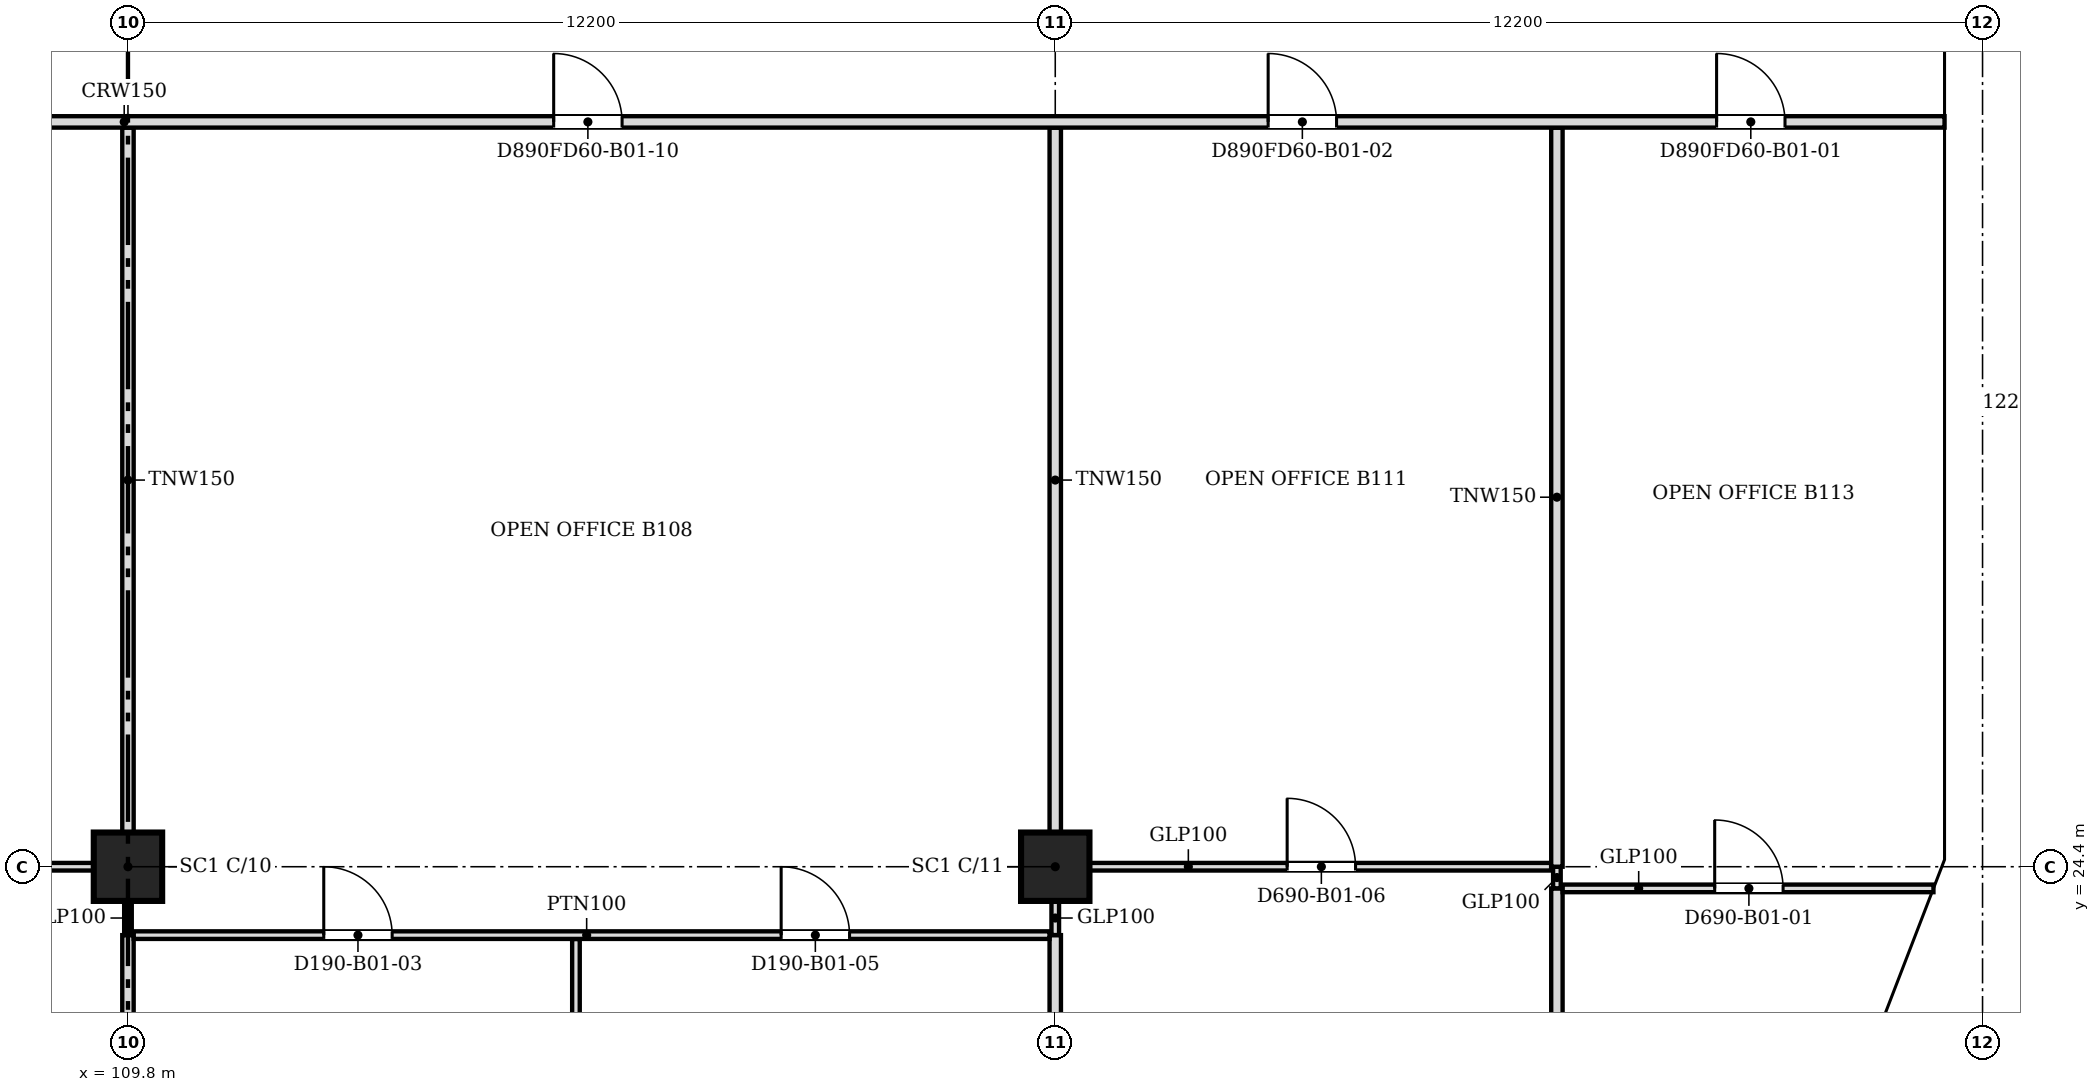
"""IFC4 building model, lengths in metres.
Left out: names, types, materials, properties, quantities, classifications, styles, units other than length and angle.
Written with IfcOpenShell. Run it as: python <this file> out.ifc"""

import sys

from ifc_helpers import new_model, si_unit, direction, frame, frame_2d, origin, origin_2d, place, context, subcontext, project, spatial, polyline, rectangle, outline, extrude, faceted_brep, source, transform, mapped, element, fill, save


model = new_model("IFC4")
c1 = context("Model", 3, precision=1e-05, world=origin(), true_north=direction((0.0, 1.0)))
c2 = subcontext(c1, "Body", "Model", "MODEL_VIEW")
j1 = project(units=[si_unit("LENGTHUNIT", "METRE"), si_unit("PLANEANGLEUNIT", "RADIAN")], contexts=[c1])
p1 = place(None, origin())
s1 = spatial("IfcSite", under=j1, at=p1, CompositionType="ELEMENT")
p2 = place(p1, origin())
s2 = spatial("IfcBuilding", under=s1, at=p2, CompositionType="ELEMENT")
p3 = place(p2, frame((0.0, 0.0, 16.8)))
s3 = spatial("IfcBuildingStorey", under=s2, at=p3, CompositionType="ELEMENT", Elevation=16.8)
for number, where, z_axis, x_axis in (
    (1, (109.8, 24.4, 0.0), (0.0, 0.0, 1.0), (1.0, 0.0, 0.0)),
    (2, (122.0, 24.4, 0.0), (0.0, 0.0, 1.0), (1.0, 0.0, 0.0)),
):
    element("IfcColumn", number, at=place(p3, frame(where, z_axis=z_axis, x_axis=x_axis)), inside=s3, PredefinedType="COLUMN", context=c2, shape_type="SweptSolid", body=[
        extrude(rectangle(XDim=0.9, YDim=0.9, at=origin_2d()), origin(), (0.0, 0.0, 1.0), 4.3),
    ])
m1 = source(origin(), c2, "Body", "Brep", [
    faceted_brep([(3.003, -0.25, 0.0), (0.053, -0.25, 4.5), (0.0, -0.25, 4.419), (0.0, -0.25, 0.0), (0.106, 0.25, 4.419), (2.957, 0.25, 0.071), (2.957, 0.25, 0.0), (0.106, 0.25, 0.0), (0.053, 0.0, 4.5), (3.003, 0.0, 0.0)], [[[0, 1, 2, 3]], [[4, 5, 6, 7]], [[5, 4, 8, 1, 0, 9]], [[2, 1, 8]], [[7, 6, 9, 0, 3]], [[7, 3, 2, 8, 4]], [[9, 6, 5]]]),
])
p4 = place(p3, frame((132.869, 21.644, 0.0), z_axis=(0.0, 0.0, 1.0), x_axis=(0.359855894603, 0.933007896601, 0.0)))
e3 = element("IfcWall", 3, at=p4, inside=s3, PredefinedType="SOLIDWALL", context=c2, shape_type="MappedRepresentation", body=[
    mapped(m1, transform((0.0, 0.0, 0.0), scale=1.0)),
])
m2 = source(origin(), c2, "Body", "SweptSolid", [
    extrude(outline(polyline([(2.541, 0.25), (0.253, 3.739), (0.253, 0.25), (2.541, 0.25)])), frame((0.0, 0.26, 0.0), z_axis=(0.0, -1.0, 0.0), x_axis=(1.0, 0.0, 0.0)), (0.0, 0.0, 1.0), 0.52),
])
p5 = place(p4, origin())
e4 = element("IfcOpeningElement", 4, at=p5, cuts=e3, PredefinedType="OPENING", context=c2, shape_type="MappedRepresentation", body=[
    mapped(m2, transform((0.0, 0.0, 0.0), scale=1.0)),
])
m3 = source(origin(), c2, "Body", "Brep", [
    faceted_brep([(6.053, -0.25, 0.0), (3.003, -0.25, 4.5), (0.0, -0.25, 0.0), (0.047, 0.25, 0.07), (3.003, 0.25, 4.5), (6.053, 0.25, 0.0), (0.047, 0.25, 0.0), (0.0, 0.0, 0.0)], [[[0, 1, 2]], [[3, 4, 5, 6]], [[5, 4, 1, 0]], [[4, 3, 7, 2, 1]], [[6, 5, 0, 2, 7]], [[6, 7, 3]]]),
])
p6 = place(p3, frame((133.95, 24.447, 0.0), z_axis=(0.0, 0.0, 1.0), x_axis=(0.0, 1.0, 0.0)))
e5 = element("IfcWall", 5, at=p6, inside=s3, PredefinedType="SOLIDWALL", context=c2, shape_type="MappedRepresentation", body=[
    mapped(m3, transform((0.0, 0.0, 0.0), scale=1.0)),
])
m4 = source(origin(), c2, "Body", "SweptSolid", [
    extrude(outline(polyline([(5.582, 0.25), (3.005, 4.052), (0.468, 0.25), (5.582, 0.25)])), frame((0.0, 0.26, 0.0), z_axis=(0.0, -1.0, 0.0), x_axis=(1.0, 0.0, 0.0)), (0.0, 0.0, 1.0), 0.52),
])
p7 = place(p6, origin())
e6 = element("IfcOpeningElement", 6, at=p7, cuts=e5, PredefinedType="OPENING", context=c2, shape_type="MappedRepresentation", body=[
    mapped(m4, transform((0.0, 0.0, 0.0), scale=1.0)),
])
m5 = source(origin(), c2, "Body", "SweptSolid", [
    extrude(outline(polyline([(6.1, 0.0), (3.05, 4.5), (0.0, 0.0), (6.1, 0.0)])), frame((0.0, 0.25, 0.0), z_axis=(0.0, -1.0, 0.0), x_axis=(1.0, 0.0, 0.0)), (0.0, 0.0, 1.0), 0.5),
])
p8 = place(p3, frame((133.95, 30.5, 0.0), z_axis=(0.0, 0.0, 1.0), x_axis=(0.0, 1.0, 0.0)))
e7 = element("IfcWall", 7, at=p8, inside=s3, PredefinedType="SOLIDWALL", context=c2, shape_type="MappedRepresentation", body=[
    mapped(m5, transform((0.0, 0.0, 0.0), scale=1.0)),
])
m6 = source(origin(), c2, "Body", "SweptSolid", [
    extrude(outline(polyline([(5.629, 0.25), (3.05, 4.054), (0.471, 0.25), (5.629, 0.25)])), frame((0.0, 0.26, 0.0), z_axis=(0.0, -1.0, 0.0), x_axis=(1.0, 0.0, 0.0)), (0.0, 0.0, 1.0), 0.52),
])
p9 = place(p8, origin())
e8 = element("IfcOpeningElement", 8, at=p9, cuts=e7, PredefinedType="OPENING", context=c2, shape_type="MappedRepresentation", body=[
    mapped(m6, transform((0.0, 0.0, 0.0), scale=1.0)),
])
p10 = place(p2, frame((0.0, 0.0, 21.3)))
s4 = spatial("IfcBuildingStorey", under=s2, at=p10, CompositionType="ELEMENT", Elevation=21.3)
m7 = source(origin(), c2, "Body", "Brep", [
    faceted_brep([(2.95, -0.25, 0.0), (2.997, -0.25, 0.07), (2.997, -0.25, 8.93), (2.95, -0.25, 9.0), (0.0, -0.25, 4.5), (0.053, 0.25, 4.581), (2.904, 0.25, 8.929), (2.904, 0.25, 0.071), (0.053, 0.25, 4.419), (2.95, 0.0, 0.0), (2.95, 0.0, 9.0), (0.0, 0.0, 4.5)], [[[0, 1, 2, 3, 4]], [[5, 6, 7, 8]], [[1, 0, 9]], [[10, 3, 2]], [[6, 5, 11, 4, 3, 10]], [[8, 7, 9, 0, 4, 11]], [[8, 11, 5]], [[1, 9, 7, 6, 10, 2]]]),
])
p11 = place(p10, frame((132.888, 21.694, -4.5), z_axis=(0.0, 0.0, 1.0), x_axis=(0.359901446078, 0.932990326376, 0.0)))
e9 = element("IfcWall", 9, at=p11, inside=s4, PredefinedType="SOLIDWALL", context=c2, shape_type="MappedRepresentation", body=[
    mapped(m7, transform((0.0, 0.0, 0.0), scale=1.0)),
])
m8 = source(origin(), c2, "Body", "SweptSolid", [
    extrude(outline(polyline([(2.75, 8.239), (0.299, 4.5), (2.75, 0.761), (2.75, 8.239)])), frame((0.0, 0.26, 0.0), z_axis=(0.0, -1.0, 0.0), x_axis=(1.0, 0.0, 0.0)), (0.0, 0.0, 1.0), 0.52),
])
p12 = place(p11, origin())
e10 = element("IfcOpeningElement", 10, at=p12, cuts=e9, PredefinedType="OPENING", context=c2, shape_type="MappedRepresentation", body=[
    mapped(m8, transform((0.0, 0.0, 0.0), scale=1.0)),
])
m9 = source(origin(), c2, "Body", "Brep", [
    faceted_brep([(0.047, -0.25, 0.0), (3.05, -0.25, 4.5), (0.047, -0.25, 9.0), (0.0, -0.25, 8.929), (0.0, -0.25, 0.071), (0.093, 0.25, 8.93), (3.05, 0.25, 4.5), (0.093, 0.25, 0.07), (0.047, 0.0, 0.0), (0.047, 0.0, 9.0)], [[[0, 1, 2, 3, 4]], [[5, 6, 7]], [[7, 6, 1, 0, 8]], [[6, 5, 9, 2, 1]], [[3, 2, 9]], [[8, 0, 4]], [[7, 8, 4, 3, 9, 5]]]),
])
p13 = place(p10, frame((133.95, 24.4, -4.5), z_axis=(0.0, 0.0, 1.0), x_axis=(0.0, 1.0, 0.0)))
e11 = element("IfcWall", 11, at=p13, inside=s4, PredefinedType="SOLIDWALL", context=c2, shape_type="MappedRepresentation", body=[
    mapped(m9, transform((0.0, 0.0, 0.0), scale=1.0)),
])
m10 = source(origin(), c2, "Body", "SweptSolid", [
    extrude(outline(polyline([(0.247, 0.75), (2.75, 4.5), (0.247, 8.25), (0.247, 0.75)])), frame((0.0, 0.26, 0.0), z_axis=(0.0, -1.0, 0.0), x_axis=(1.0, 0.0, 0.0)), (0.0, 0.0, 1.0), 0.52),
])
p14 = place(p13, origin())
e12 = element("IfcOpeningElement", 12, at=p14, cuts=e11, PredefinedType="OPENING", context=c2, shape_type="MappedRepresentation", body=[
    mapped(m10, transform((0.0, 0.0, 0.0), scale=1.0)),
])
m11 = source(origin(), c2, "Body", "SweptSolid", [
    extrude(outline(polyline([(3.05, 0.0), (6.1, 4.5), (3.05, 9.0), (0.0, 4.5), (3.05, 0.0)])), frame((0.0, 0.25, 0.0), z_axis=(0.0, -1.0, 0.0), x_axis=(1.0, 0.0, 0.0)), (0.0, 0.0, 1.0), 0.5),
])
p15 = place(p10, frame((133.95, 27.45, -4.5), z_axis=(0.0, 0.0, 1.0), x_axis=(0.0, 1.0, 0.0)))
e13 = element("IfcWall", 13, at=p15, inside=s4, PredefinedType="SOLIDWALL", context=c2, shape_type="MappedRepresentation", body=[
    mapped(m11, transform((0.0, 0.0, 0.0), scale=1.0)),
])
m12 = source(origin(), c2, "Body", "SweptSolid", [
    extrude(outline(polyline([(3.05, 0.446), (5.798, 4.5), (3.05, 8.554), (0.302, 4.5), (3.05, 0.446)])), frame((0.0, 0.26, 0.0), z_axis=(0.0, -1.0, 0.0), x_axis=(1.0, 0.0, 0.0)), (0.0, 0.0, 1.0), 0.52),
])
p16 = place(p15, origin())
e14 = element("IfcOpeningElement", 14, at=p16, cuts=e13, PredefinedType="OPENING", context=c2, shape_type="MappedRepresentation", body=[
    mapped(m12, transform((0.0, 0.0, 0.0), scale=1.0)),
])
m13 = source(origin(), c2, "Body", "Brep", [
    faceted_brep([(3.05, -0.25, 0.0), (6.1, -0.25, 4.5), (6.1, -0.25, 4.5), (3.05, -0.25, 9.0), (0.0, -0.25, 4.5), (0.0, 0.25, 4.5), (3.05, 0.25, 9.0), (6.1, 0.25, 4.5), (6.1, 0.25, 4.5), (3.05, 0.25, 0.0)], [[[0, 1, 2, 3, 4]], [[5, 6, 7, 8, 9]], [[9, 8, 1, 0]], [[7, 6, 3, 2]], [[6, 5, 4, 3]], [[5, 9, 0, 4]], [[1, 8, 7, 2]]]),
])
p17 = place(p10, frame((133.95, 33.55, -4.5), z_axis=(0.0, 0.0, 1.0), x_axis=(0.0, 1.0, 0.0)))
e15 = element("IfcWall", 15, at=p17, inside=s4, PredefinedType="SOLIDWALL", context=c2, shape_type="MappedRepresentation", body=[
    mapped(m13, transform((0.0, 0.0, 0.0), scale=1.0)),
])
p18 = place(p17, origin())
e16 = element("IfcOpeningElement", 16, at=p18, cuts=e15, PredefinedType="OPENING", context=c2, shape_type="MappedRepresentation", body=[
    mapped(m12, transform((0.0, 0.0, 0.0), scale=1.0)),
])
p19 = place(p3, frame((109.8, 18.8, 0.0), z_axis=(0.0, 0.0, 1.0), x_axis=(0.0, 1.0, 0.0)))
e17 = element("IfcWall", 17, at=p19, inside=s3, PredefinedType="PARTITIONING", context=c2, shape_type="SweptSolid", body=[
    extrude(rectangle(XDim=4.7, YDim=0.15, at=frame_2d((2.35, 0.0))), origin(), (0.0, 0.0, 1.0), 3.415),
])
p20 = place(p3, frame((115.694, 18.8, 0.0), z_axis=(0.0, 0.0, 1.0), x_axis=(0.0, 1.0, 0.0)))
e18 = element("IfcWall", 18, at=p20, inside=s3, PredefinedType="PARTITIONING", context=c2, shape_type="SweptSolid", body=[
    extrude(rectangle(XDim=4.649, YDim=0.1, at=frame_2d((2.324, 0.0))), origin(), (0.0, 0.0, 1.0), 3.415),
])
p21 = place(p3, frame((122.0, 18.8, 0.0), z_axis=(0.0, 0.0, 1.0), x_axis=(0.0, 1.0, 0.0)))
e19 = element("IfcWall", 19, at=p21, inside=s3, PredefinedType="PARTITIONING", context=c2, shape_type="SweptSolid", body=[
    extrude(rectangle(XDim=4.7, YDim=0.15, at=frame_2d((2.35, 0.0))), origin(), (0.0, 0.0, 1.0), 3.415),
])
p22 = place(p3, frame((128.6, 19.029, 0.0), z_axis=(0.0, 0.0, 1.0), x_axis=(0.0, 1.0, 0.0)))
e20 = element("IfcWall", 20, at=p22, inside=s3, PredefinedType="PARTITIONING", context=c2, shape_type="SweptSolid", body=[
    extrude(rectangle(XDim=5.086, YDim=0.15, at=frame_2d((2.543, 0.0))), origin(), (0.0, 0.0, 1.0), 3.415),
])
p23 = place(p3, frame((109.8, 23.501, 0.0), z_axis=(0.0, 0.0, 1.0), x_axis=(0.0, 1.0, 0.0)))
e21 = element("IfcWall", 21, at=p23, inside=s3, PredefinedType="PARTITIONING", context=c2, shape_type="SweptSolid", body=[
    extrude(rectangle(XDim=0.448, YDim=0.1, at=frame_2d((0.224, 0.0))), origin(), (0.0, 0.0, 1.0), 3.415),
])
p24 = place(p3, frame((121.924, 23.5, 0.0), z_axis=(0.0, 0.0, 1.0), x_axis=(-1.0, 0.0, 0.0)))
e22 = element("IfcWall", 22, at=p24, inside=s3, PredefinedType="PARTITIONING", context=c2, shape_type="SweptSolid", body=[
    extrude(rectangle(XDim=12.048, YDim=0.1, at=frame_2d((6.024, 0.0))), origin(), (0.0, 0.0, 1.0), 3.415),
])
m14 = source(origin(), c2, "Body", "SweptSolid", [
    extrude(rectangle(XDim=0.9, YDim=2.1, at=frame_2d((0.45, 1.05))), frame((0.0, 0.06, 0.0), z_axis=(0.0, -1.0, 0.0), x_axis=(1.0, 0.0, 0.0)), (0.0, 0.0, 1.0), 0.12),
])
p25 = place(p24, frame((8.648, 0.0, 0.0)))
e23 = element("IfcOpeningElement", 23, at=p25, cuts=e22, PredefinedType="OPENING", context=c2, shape_type="MappedRepresentation", body=[
    mapped(m14, transform((0.0, 0.0, 0.0), scale=1.0)),
])
p26 = place(p24, frame((2.63, 0.0, 0.0)))
e24 = element("IfcOpeningElement", 24, at=p26, cuts=e22, PredefinedType="OPENING", context=c2, shape_type="MappedRepresentation", body=[
    mapped(m14, transform((0.0, 0.0, 0.0), scale=1.0)),
])
p27 = place(p3, frame((122.0, 23.501, 0.0), z_axis=(0.0, 0.0, 1.0), x_axis=(0.0, 1.0, 0.0)))
e25 = element("IfcWall", 25, at=p27, inside=s3, PredefinedType="PARTITIONING", context=c2, shape_type="SweptSolid", body=[
    extrude(rectangle(XDim=0.448, YDim=0.1, at=frame_2d((0.224, 0.0))), origin(), (0.0, 0.0, 1.0), 3.415),
])
p28 = place(p3, frame((133.554, 24.115, 0.0), z_axis=(0.0, 0.0, 1.0), x_axis=(-1.0, 0.0, 0.0)))
e26 = element("IfcWall", 26, at=p28, inside=s3, PredefinedType="PARTITIONING", context=c2, shape_type="SweptSolid", body=[
    extrude(rectangle(XDim=4.878, YDim=0.1, at=frame_2d((2.439, 0.0))), origin(), (0.0, 0.0, 1.0), 3.415),
])
p29 = place(p28, frame((1.978, 0.0, 0.0)))
e27 = element("IfcOpeningElement", 27, at=p29, cuts=e26, PredefinedType="OPENING", context=c2, shape_type="MappedRepresentation", body=[
    mapped(m14, transform((0.0, 0.0, 0.0), scale=1.0)),
])
p30 = place(p3, frame((128.6, 24.116, 0.0), z_axis=(0.0, 0.0, 1.0), x_axis=(0.0, 1.0, 0.0)))
e28 = element("IfcWall", 28, at=p30, inside=s3, PredefinedType="PARTITIONING", context=c2, shape_type="SweptSolid", body=[
    extrude(rectangle(XDim=0.283, YDim=0.1, at=frame_2d((0.142, 0.0))), origin(), (0.0, 0.0, 1.0), 3.415),
])
p31 = place(p3, frame((109.349, 24.4, 0.0), z_axis=(0.0, 0.0, 1.0), x_axis=(-1.0, 0.0, 0.0)))
e29 = element("IfcWall", 29, at=p31, inside=s3, PredefinedType="PARTITIONING", context=c2, shape_type="SweptSolid", body=[
    extrude(rectangle(XDim=5.804, YDim=0.1, at=frame_2d((2.902, 0.0))), origin(), (0.0, 0.0, 1.0), 3.415),
])
p32 = place(p31, frame((2.404, 0.0, 0.0)))
e30 = element("IfcOpeningElement", 30, at=p32, cuts=e29, PredefinedType="OPENING", context=c2, shape_type="MappedRepresentation", body=[
    mapped(m14, transform((0.0, 0.0, 0.0), scale=1.0)),
])
p33 = place(p3, frame((128.524, 24.4, 0.0), z_axis=(0.0, 0.0, 1.0), x_axis=(-1.0, 0.0, 0.0)))
e31 = element("IfcWall", 31, at=p33, inside=s3, PredefinedType="PARTITIONING", context=c2, shape_type="SweptSolid", body=[
    extrude(rectangle(XDim=6.073, YDim=0.1, at=frame_2d((3.037, 0.0))), origin(), (0.0, 0.0, 1.0), 3.415),
])
p34 = place(p33, frame((2.573, 0.0, 0.0)))
e32 = element("IfcOpeningElement", 32, at=p34, cuts=e31, PredefinedType="OPENING", context=c2, shape_type="MappedRepresentation", body=[
    mapped(m14, transform((0.0, 0.0, 0.0), scale=1.0)),
])
p35 = place(p3, frame((128.6, 24.4, 0.0), z_axis=(0.0, 0.0, 1.0), x_axis=(0.0, 1.0, 0.0)))
e33 = element("IfcWall", 33, at=p35, inside=s3, PredefinedType="PARTITIONING", context=c2, shape_type="SweptSolid", body=[
    extrude(rectangle(XDim=9.724, YDim=0.15, at=frame_2d((4.862, 0.0))), origin(), (0.0, 0.0, 1.0), 3.415),
])
for number, where, z_axis, x_axis in (
    (34, (109.8, 24.851, 0.0), (0.0, 0.0, 1.0), (0.0, 1.0, 0.0)),
    (35, (122.0, 24.851, 0.0), (0.0, 0.0, 1.0), (0.0, 1.0, 0.0)),
):
    element("IfcWall", number, at=place(p3, frame(where, z_axis=z_axis, x_axis=x_axis)), inside=s3, PredefinedType="PARTITIONING", context=c2, shape_type="SweptSolid", body=[
        extrude(rectangle(XDim=9.273, YDim=0.15, at=frame_2d((4.636, 0.0))), origin(), (0.0, 0.0, 1.0), 3.415),
    ])
p36 = place(p3, frame((133.7, 34.2, 0.0), z_axis=(0.0, 0.0, 1.0), x_axis=(-1.0, 0.0, 0.0)))
e36 = element("IfcWall", 36, at=p36, inside=s3, PredefinedType="PARTITIONING", context=c2, shape_type="SweptSolid", body=[
    extrude(rectangle(XDim=47.8, YDim=0.15, at=frame_2d((23.9, 0.0))), origin(), (0.0, 0.0, 1.0), 3.415),
])
m15 = source(origin(), c2, "Body", "SweptSolid", [
    extrude(rectangle(XDim=0.9, YDim=2.1, at=frame_2d((0.45, 1.05))), frame((0.0, 0.085, 0.0), z_axis=(0.0, -1.0, 0.0), x_axis=(1.0, 0.0, 0.0)), (0.0, 0.0, 1.0), 0.17),
])
p37 = place(p36, frame((2.099, 0.0, 0.0)))
e37 = element("IfcOpeningElement", 37, at=p37, cuts=e36, PredefinedType="OPENING", context=c2, shape_type="MappedRepresentation", body=[
    mapped(m15, transform((0.0, 0.0, 0.0), scale=1.0)),
])
p38 = place(p36, frame((7.999, 0.0, 0.0)))
e38 = element("IfcOpeningElement", 38, at=p38, cuts=e36, PredefinedType="OPENING", context=c2, shape_type="MappedRepresentation", body=[
    mapped(m15, transform((0.0, 0.0, 0.0), scale=1.0)),
])
p39 = place(p36, frame((41.5, 0.0, 0.0)))
e39 = element("IfcOpeningElement", 39, at=p39, cuts=e36, PredefinedType="OPENING", context=c2, shape_type="MappedRepresentation", body=[
    mapped(m15, transform((0.0, 0.0, 0.0), scale=1.0)),
])
p40 = place(p36, frame((17.399, 0.0, 0.0)))
e40 = element("IfcOpeningElement", 40, at=p40, cuts=e36, PredefinedType="OPENING", context=c2, shape_type="MappedRepresentation", body=[
    mapped(m15, transform((0.0, 0.0, 0.0), scale=1.0)),
])
p41 = place(p36, frame((29.6, 0.0, 0.0)))
e41 = element("IfcOpeningElement", 41, at=p41, cuts=e36, PredefinedType="OPENING", context=c2, shape_type="MappedRepresentation", body=[
    mapped(m15, transform((0.0, 0.0, 0.0), scale=1.0)),
])
m16 = source(origin(), c2, "Body", "SweptSolid", [
    extrude(rectangle(XDim=0.9, YDim=2.1, at=frame_2d((0.45, 1.05))), frame((0.0, 0.025, 0.0), z_axis=(0.0, -1.0, 0.0), x_axis=(1.0, 0.0, 0.0)), (0.0, 0.0, 1.0), 0.05),
])
p42 = place(p29, origin())
e42 = element("IfcDoor", 42, at=p42, inside=s3, OperationType="SINGLE_SWING_RIGHT", PredefinedType="DOOR", context=c2, shape_type="MappedRepresentation", body=[
    mapped(m16, transform((0.0, 0.0, 0.0), scale=1.0)),
])
fill(e27, e42)
p43 = place(p37, origin())
e43 = element("IfcDoor", 43, at=p43, inside=s3, OperationType="SINGLE_SWING_RIGHT", PredefinedType="DOOR", context=c2, shape_type="MappedRepresentation", body=[
    mapped(m16, transform((0.0, 0.0, 0.0), scale=1.0)),
])
fill(e37, e43)
p44 = place(p25, origin())
e44 = element("IfcDoor", 44, at=p44, inside=s3, OperationType="SINGLE_SWING_RIGHT", PredefinedType="DOOR", context=c2, shape_type="MappedRepresentation", body=[
    mapped(m16, transform((0.0, 0.0, 0.0), scale=1.0)),
])
fill(e23, e44)
p45 = place(p34, origin())
e45 = element("IfcDoor", 45, at=p45, inside=s3, OperationType="SINGLE_SWING_RIGHT", PredefinedType="DOOR", context=c2, shape_type="MappedRepresentation", body=[
    mapped(m16, transform((0.0, 0.0, 0.0), scale=1.0)),
])
fill(e32, e45)
p46 = place(p26, origin())
e46 = element("IfcDoor", 46, at=p46, inside=s3, OperationType="SINGLE_SWING_RIGHT", PredefinedType="DOOR", context=c2, shape_type="MappedRepresentation", body=[
    mapped(m16, transform((0.0, 0.0, 0.0), scale=1.0)),
])
fill(e24, e46)
p47 = place(p38, origin())
e47 = element("IfcDoor", 47, at=p47, inside=s3, OperationType="SINGLE_SWING_RIGHT", PredefinedType="DOOR", context=c2, shape_type="MappedRepresentation", body=[
    mapped(m16, transform((0.0, 0.0, 0.0), scale=1.0)),
])
fill(e38, e47)
p48 = place(p40, origin())
e48 = element("IfcDoor", 48, at=p48, inside=s3, OperationType="SINGLE_SWING_RIGHT", PredefinedType="DOOR", context=c2, shape_type="MappedRepresentation", body=[
    mapped(m16, transform((0.0, 0.0, 0.0), scale=1.0)),
])
fill(e40, e48)
save(model, sys.argv[1])
